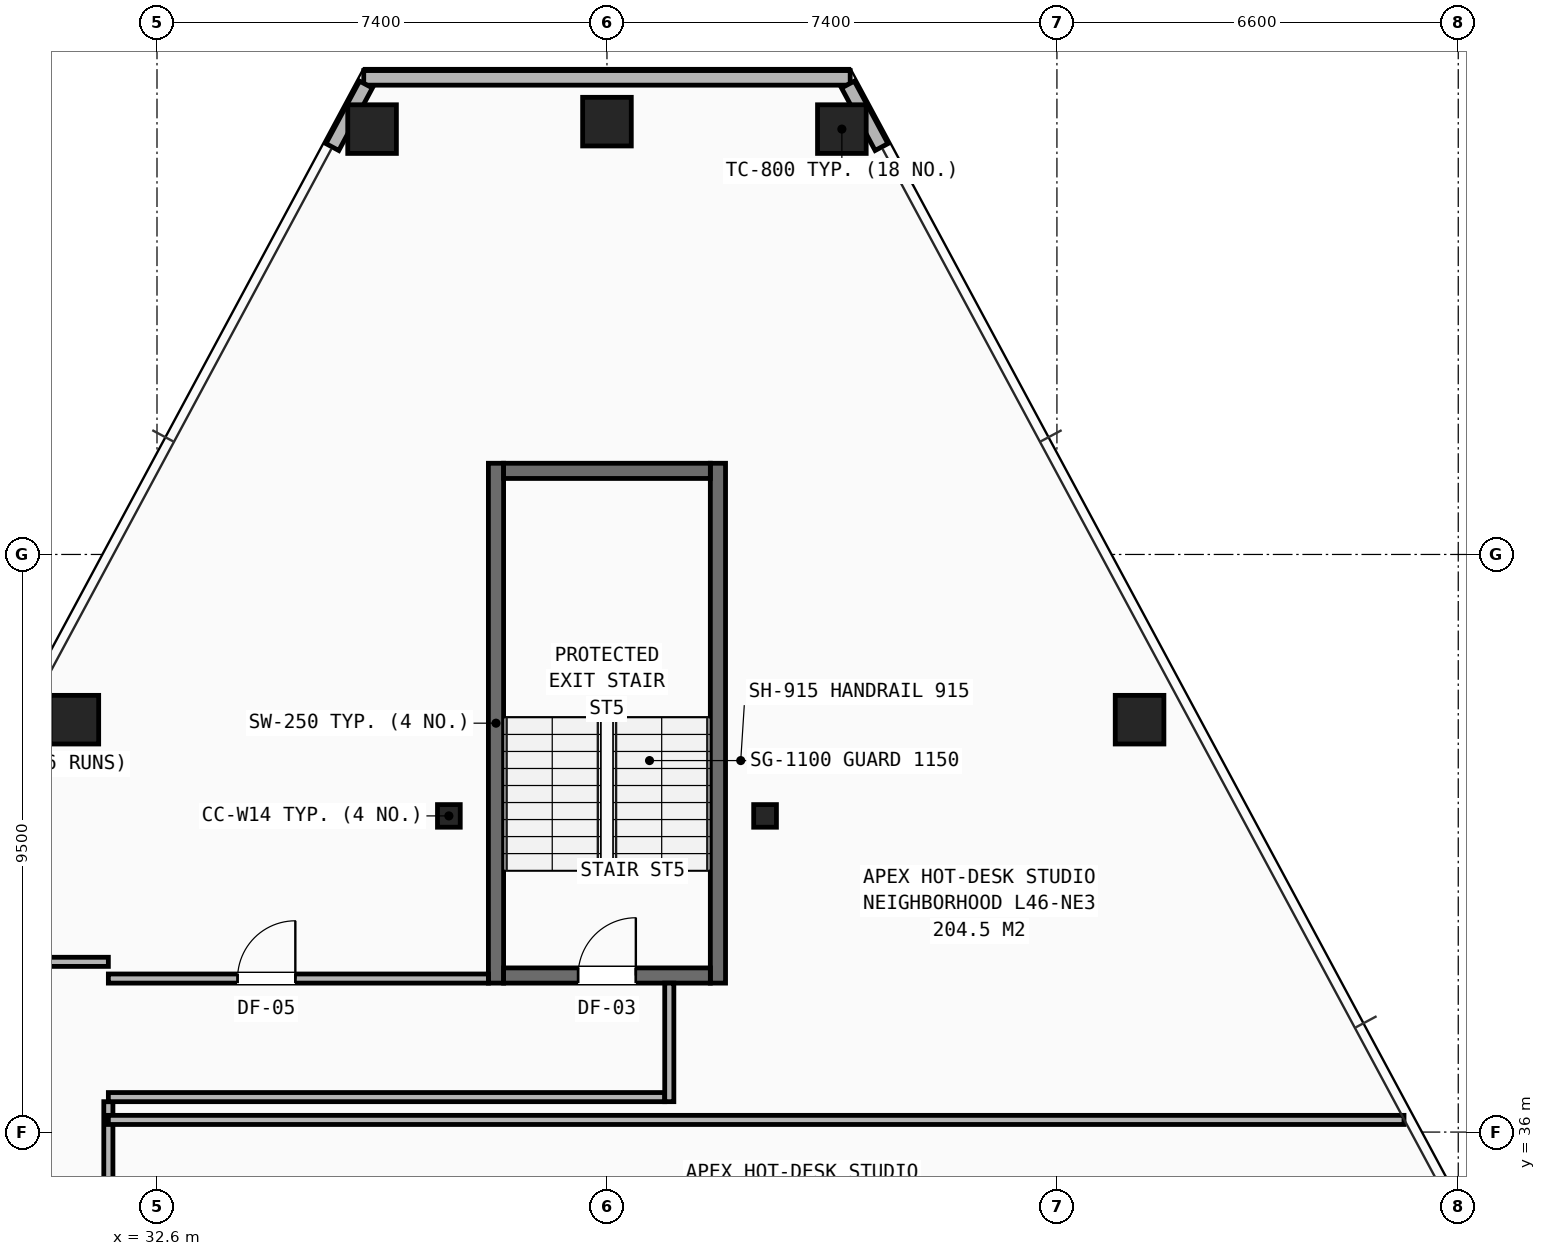
"""IFC4 building model, lengths in metres.
Left out: names, types, materials, properties, quantities, classifications, styles, units other than length and angle.
Written with IfcOpenShell. Run it as: python <this file> out.ifc"""

import sys

from ifc_helpers import new_model, si_unit, direction, frame, frame_2d, origin, origin_2d, place, context, subcontext, project, spatial, rectangle, hollow_rectangle, i_section, extrude, element, fill, save


model = new_model("IFC4")
c1 = context("Model", 3, precision=1e-05, world=origin(), true_north=direction((0.0, 1.0)))
c2 = subcontext(c1, "Body", "Model", "MODEL_VIEW")
j1 = project(units=[si_unit("LENGTHUNIT", "METRE"), si_unit("PLANEANGLEUNIT", "RADIAN")], contexts=[c1])
p1 = place(None, origin())
s1 = spatial("IfcSite", under=j1, at=p1, CompositionType="ELEMENT")
p2 = place(p1, origin())
s2 = spatial("IfcBuilding", under=s1, at=p2, CompositionType="ELEMENT")
p3 = place(p2, frame((0.0, 0.0, 162.0)))
s3 = spatial("IfcBuildingStorey", under=s2, at=p3, CompositionType="ELEMENT", Elevation=162.0)
for number, where, z_axis, x_axis in (
    (1, (37.4, 41.2, 0.0), (0.0, 0.0, 1.0), (1.0, 0.0, 0.0)),
    (2, (42.6, 41.2, 0.0), (0.0, 0.0, 1.0), (1.0, 0.0, 0.0)),
):
    element("IfcColumn", number, at=place(p3, frame(where, z_axis=z_axis, x_axis=x_axis)), inside=s3, PredefinedType="COLUMN", context=c2, shape_type="SweptSolid", body=[
        extrude(i_section(OverallWidth=0.374, OverallDepth=0.372, WebThickness=0.016, FlangeThickness=0.026, at=origin_2d()), origin(), (0.0, 0.0, 1.0), 3.45),
    ])
for number, where, z_axis, x_axis in (
    (3, (43.863, 52.496, 0.0), (0.0, 0.0, 1.0), (1.0, 0.0, 0.0)),
    (4, (40.0, 52.618, 0.0), (0.0, 0.0, 1.0), (1.0, 0.0, 0.0)),
    (5, (36.137, 52.496, 0.0), (0.0, 0.0, 1.0), (1.0, 0.0, 0.0)),
    (6, (31.241, 42.783, 0.0), (0.0, 0.0, 1.0), (1.0, 0.0, 0.0)),
    (7, (48.759, 42.783, 0.0), (0.0, 0.0, 1.0), (1.0, 0.0, 0.0)),
):
    element("IfcColumn", number, at=place(p3, frame(where, z_axis=z_axis, x_axis=x_axis)), inside=s3, PredefinedType="COLUMN", context=c2, shape_type="SweptSolid", body=[
        extrude(hollow_rectangle(XDim=0.8, YDim=0.8, WallThickness=0.055, at=origin_2d()), origin(), (0.0, 0.0, 1.0), 3.45),
    ])
p4 = place(p3, frame((36.0, 53.338, 0.0), z_axis=(0.0, 0.0, 1.0), x_axis=(1.0, 0.0, 0.0)))
e8 = element("IfcWall", 8, at=p4, inside=s3, PredefinedType="SHEAR", context=c2, shape_type="SweptSolid", body=[
    extrude(rectangle(XDim=8.0, YDim=0.24, at=frame_2d((4.0, 0.0))), origin(), (0.0, 0.0, 1.0), 2.583),
])
for number, where, z_axis, x_axis in (
    (9, (36.037, 53.229, 0.0), (0.0, 0.0, 1.0), (-0.473, -0.881, 0.0)),
    (10, (44.516, 52.2, 0.0), (0.0, 0.0, 1.0), (-0.473, 0.881, 0.0)),
):
    element("IfcWall", number, at=place(p3, frame(where, z_axis=z_axis, x_axis=x_axis)), inside=s3, PredefinedType="SHEAR", context=c2, shape_type="SweptSolid", body=[
        extrude(rectangle(XDim=1.168, YDim=0.24, at=frame_2d((0.584, 0.0))), origin(), (0.0, 0.0, 1.0), 2.583),
    ])
p5 = place(p3, frame((31.8, 31.2, 0.0), z_axis=(0.0, 0.0, 1.0), x_axis=(0.0, 1.0, 0.0)))
e11 = element("IfcWall", 11, at=p5, inside=s3, PredefinedType="PARTITIONING", context=c2, shape_type="SweptSolid", body=[
    extrude(rectangle(XDim=5.3, YDim=0.15, at=frame_2d((2.65, 0.0))), origin(), (0.0, 0.0, 1.0), 2.252),
])
p6 = place(p5, frame((0.5, 0.0, 0.0)))
e12 = element("IfcOpeningElement", 12, at=p6, cuts=e11, PredefinedType="OPENING", context=c2, shape_type="SweptSolid", body=[
    extrude(rectangle(XDim=0.95, YDim=2.1, at=frame_2d((0.475, 1.05))), frame((0.0, 0.085, 0.0), z_axis=(0.0, -1.0, 0.0), x_axis=(1.0, 0.0, 0.0)), (0.0, 0.0, 1.0), 0.17),
])
p7 = place(p5, frame((2.9, 0.0, 0.0)))
e13 = element("IfcOpeningElement", 13, at=p7, cuts=e11, PredefinedType="OPENING", context=c2, shape_type="SweptSolid", body=[
    extrude(rectangle(XDim=0.95, YDim=2.1, at=frame_2d((0.475, 1.05))), frame((0.0, 0.085, 0.0), z_axis=(0.0, -1.0, 0.0), x_axis=(1.0, 0.0, 0.0)), (0.0, 0.0, 1.0), 0.17),
])
p8 = place(p3, frame((29.6, 38.8, 0.0), z_axis=(0.0, 0.0, 1.0), x_axis=(1.0, 0.0, 0.0)))
e14 = element("IfcWall", 14, at=p8, inside=s3, PredefinedType="PARTITIONING", context=c2, shape_type="SweptSolid", body=[
    extrude(rectangle(XDim=2.2, YDim=0.15, at=frame_2d((1.1, 0.0))), origin(), (0.0, 0.0, 1.0), 2.589),
])
p9 = place(p3, frame((31.8, 36.2, 0.0), z_axis=(0.0, 0.0, 1.0), x_axis=(1.0, 0.0, 0.0)))
e15 = element("IfcWall", 15, at=p9, inside=s3, PredefinedType="PARTITIONING", context=c2, shape_type="SweptSolid", body=[
    extrude(rectangle(XDim=21.308, YDim=0.15, at=frame_2d((10.654, 0.0))), origin(), (0.0, 0.0, 1.0), 2.589),
])
for number, where, z_axis, x_axis in (
    (16, (38.175, 38.45, 0.0), (0.0, 0.0, 1.0), (0.0, 1.0, 0.0)),
    (17, (41.825, 38.45, 0.0), (0.0, 0.0, 1.0), (0.0, 1.0, 0.0)),
):
    element("IfcWall", number, at=place(p3, frame(where, z_axis=z_axis, x_axis=x_axis)), inside=s3, PredefinedType="SHEAR", context=c2, shape_type="SweptSolid", body=[
        extrude(rectangle(XDim=8.55, YDim=0.25, at=frame_2d((4.275, 0.0))), origin(), (0.0, 0.0, 1.0), 3.21),
    ])
p10 = place(p3, frame((38.3, 38.575, 0.0), z_axis=(0.0, 0.0, 1.0), x_axis=(1.0, 0.0, 0.0)))
e18 = element("IfcWall", 18, at=p10, inside=s3, PredefinedType="SHEAR", context=c2, shape_type="SweptSolid", body=[
    extrude(rectangle(XDim=3.4, YDim=0.25, at=frame_2d((1.7, 0.0))), origin(), (0.0, 0.0, 1.0), 3.21),
])
p11 = place(p10, frame((1.225, 0.0, 0.0)))
e19 = element("IfcOpeningElement", 19, at=p11, cuts=e18, PredefinedType="OPENING", context=c2, shape_type="SweptSolid", body=[
    extrude(rectangle(XDim=0.95, YDim=2.1, at=frame_2d((0.475, 1.05))), frame((0.0, 0.135, 0.0), z_axis=(0.0, -1.0, 0.0), x_axis=(1.0, 0.0, 0.0)), (0.0, 0.0, 1.0), 0.27),
])
p12 = place(p3, frame((38.3, 46.875, 0.0), z_axis=(0.0, 0.0, 1.0), x_axis=(1.0, 0.0, 0.0)))
e20 = element("IfcWall", 20, at=p12, inside=s3, PredefinedType="SHEAR", context=c2, shape_type="SweptSolid", body=[
    extrude(rectangle(XDim=3.4, YDim=0.25, at=frame_2d((1.7, 0.0))), origin(), (0.0, 0.0, 1.0), 3.21),
])
p13 = place(p3, frame((31.8, 36.575, 0.0), z_axis=(0.0, 0.0, 1.0), x_axis=(1.0, 0.0, 0.0)))
e21 = element("IfcWall", 21, at=p13, inside=s3, PredefinedType="PARTITIONING", context=c2, shape_type="SweptSolid", body=[
    extrude(rectangle(XDim=9.15, YDim=0.15, at=frame_2d((4.575, 0.0))), origin(), (0.0, 0.0, 1.0), 3.21),
])
p14 = place(p3, frame((31.8, 38.525, 0.0), z_axis=(0.0, 0.0, 1.0), x_axis=(1.0, 0.0, 0.0)))
e22 = element("IfcWall", 22, at=p14, inside=s3, PredefinedType="PARTITIONING", context=c2, shape_type="SweptSolid", body=[
    extrude(rectangle(XDim=6.25, YDim=0.15, at=frame_2d((3.125, 0.0))), origin(), (0.0, 0.0, 1.0), 2.793),
])
p15 = place(p14, frame((2.125, 0.0, 0.0)))
e23 = element("IfcOpeningElement", 23, at=p15, cuts=e22, PredefinedType="OPENING", context=c2, shape_type="SweptSolid", body=[
    extrude(rectangle(XDim=0.95, YDim=2.1, at=frame_2d((0.475, 1.05))), frame((0.0, 0.085, 0.0), z_axis=(0.0, -1.0, 0.0), x_axis=(1.0, 0.0, 0.0)), (0.0, 0.0, 1.0), 0.17),
])
p16 = place(p3, frame((41.025, 36.5, 0.0), z_axis=(0.0, 0.0, 1.0), x_axis=(0.0, 1.0, 0.0)))
e24 = element("IfcWall", 24, at=p16, inside=s3, PredefinedType="PARTITIONING", context=c2, shape_type="SweptSolid", body=[
    extrude(rectangle(XDim=1.95, YDim=0.15, at=frame_2d((0.975, 0.0))), origin(), (0.0, 0.0, 1.0), 3.21),
])
p17 = place(p15, origin())
e25 = element("IfcDoor", 25, at=p17, inside=s3, OperationType="SINGLE_SWING_RIGHT", PredefinedType="DOOR", context=c2, shape_type="SweptSolid", body=[
    extrude(rectangle(XDim=0.95, YDim=2.1, at=frame_2d((0.475, 1.05))), frame((0.0, 0.025, 0.0), z_axis=(0.0, -1.0, 0.0), x_axis=(1.0, 0.0, 0.0)), (0.0, 0.0, 1.0), 0.05),
])
fill(e23, e25)
p18 = place(p11, origin())
e26 = element("IfcDoor", 26, at=p18, inside=s3, OperationType="SINGLE_SWING_RIGHT", PredefinedType="DOOR", context=c2, shape_type="SweptSolid", body=[
    extrude(rectangle(XDim=0.95, YDim=2.1, at=frame_2d((0.475, 1.05))), frame((0.0, 0.025, 0.0), z_axis=(0.0, -1.0, 0.0), x_axis=(1.0, 0.0, 0.0)), (0.0, 0.0, 1.0), 0.05),
])
fill(e19, e26)
save(model, sys.argv[1])
